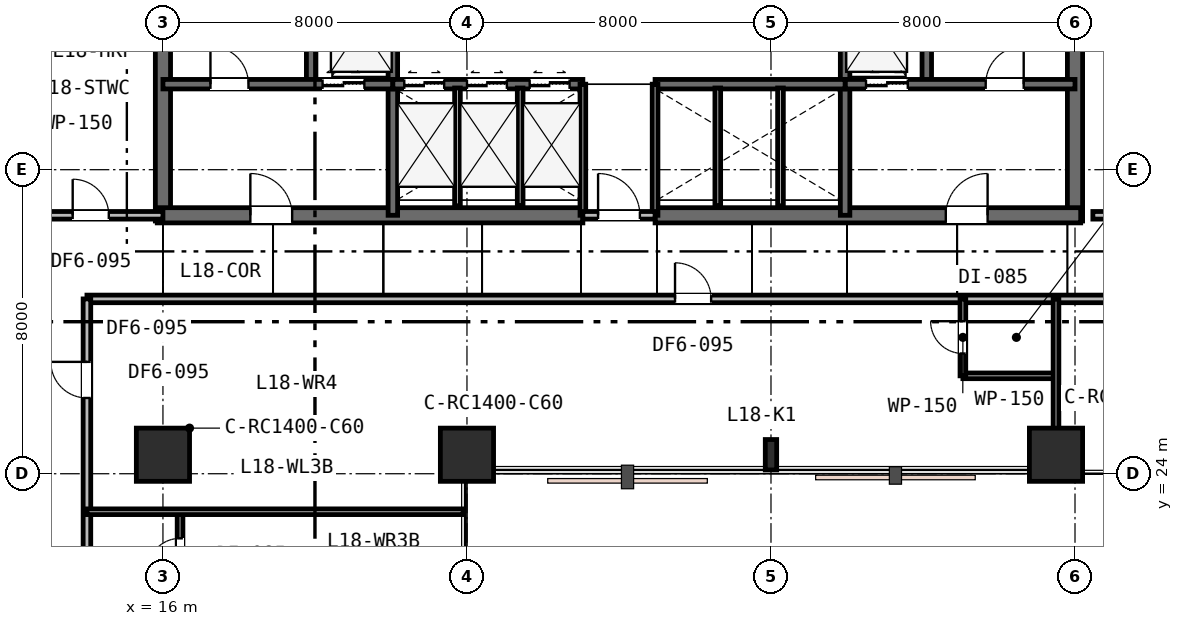
"""IFC4 building model, lengths in metres.
Left out: names, types, materials, properties, quantities, classifications, styles, units other than length and angle.
Written with IfcOpenShell. Run it as: python <this file> out.ifc"""

import sys

from ifc_helpers import new_model, si_unit, direction, frame, frame_2d, origin, origin_2d, place, context, subcontext, project, spatial, rectangle, i_section, extrude, element, fill, save


model = new_model("IFC4")
c1 = context("Model", 3, precision=1e-05, world=origin(), true_north=direction((0.0, 1.0)))
c2 = subcontext(c1, "Body", "Model", "MODEL_VIEW")
j1 = project(units=[si_unit("LENGTHUNIT", "METRE"), si_unit("PLANEANGLEUNIT", "RADIAN")], contexts=[c1])
p1 = place(None, origin())
s1 = spatial("IfcSite", under=j1, at=p1, CompositionType="ELEMENT")
p2 = place(p1, origin())
s2 = spatial("IfcBuilding", under=s1, at=p2, CompositionType="ELEMENT")
p3 = place(p2, frame((0.0, 0.0, 72.6)))
s3 = spatial("IfcBuildingStorey", under=s2, at=p3, CompositionType="ELEMENT", Elevation=72.6)
for number, where, z_axis, x_axis in (
    (1, (16.0, 30.65, 0.0), (0.0, 0.0, 1.0), (0.0, 1.0, 0.0)),
    (2, (40.0, 30.65, 0.0), (0.0, 0.0, 1.0), (0.0, 1.0, 0.0)),
):
    element("IfcWall", number, at=place(p3, frame(where, z_axis=z_axis, x_axis=x_axis)), inside=s3, PredefinedType="SHEAR", context=c2, shape_type="SweptSolid", body=[
        extrude(rectangle(XDim=12.3, YDim=0.4, at=frame_2d((6.15, 0.0))), origin(), (0.0, 0.0, 1.0), 3.6),
    ])
p4 = place(p3, frame((15.85, 30.8, 0.0), z_axis=(0.0, 0.0, 1.0), x_axis=(1.0, 0.0, 0.0)))
e3 = element("IfcWall", 3, at=p4, inside=s3, PredefinedType="SHEAR", context=c2, shape_type="SweptSolid", body=[
    extrude(rectangle(XDim=11.2, YDim=0.4, at=frame_2d((5.6, 0.0))), origin(), (0.0, 0.0, 1.0), 3.6),
])
p5 = place(p4, frame((2.45, 0.0, 0.0)))
e4 = element("IfcOpeningElement", 4, at=p5, cuts=e3, PredefinedType="OPENING", context=c2, shape_type="SweptSolid", body=[
    extrude(rectangle(XDim=1.1, YDim=2.15, at=frame_2d((0.55, 1.075))), frame((0.0, 0.21, 0.0), z_axis=(0.0, -1.0, 0.0), x_axis=(1.0, 0.0, 0.0)), (0.0, 0.0, 1.0), 0.42),
])
p6 = place(p3, frame((28.95, 30.8, 0.0), z_axis=(0.0, 0.0, 1.0), x_axis=(1.0, 0.0, 0.0)))
e5 = element("IfcWall", 5, at=p6, inside=s3, PredefinedType="SHEAR", context=c2, shape_type="SweptSolid", body=[
    extrude(rectangle(XDim=11.2, YDim=0.4, at=frame_2d((5.6, 0.0))), origin(), (0.0, 0.0, 1.0), 3.6),
])
p7 = place(p6, frame((7.65, 0.0, 0.0)))
e6 = element("IfcOpeningElement", 6, at=p7, cuts=e5, PredefinedType="OPENING", context=c2, shape_type="SweptSolid", body=[
    extrude(rectangle(XDim=1.1, YDim=2.15, at=frame_2d((0.55, 1.075))), frame((0.0, 0.21, 0.0), z_axis=(0.0, -1.0, 0.0), x_axis=(1.0, 0.0, 0.0)), (0.0, 0.0, 1.0), 0.42),
])
for number, where, z_axis, x_axis in (
    (7, (19.9, 34.25, 0.0), (0.0, 0.0, 1.0), (0.0, 1.0, 0.0)),
    (8, (36.1, 34.25, 0.0), (0.0, 0.0, 1.0), (0.0, 1.0, 0.0)),
):
    element("IfcWall", number, at=place(p3, frame(where, z_axis=z_axis, x_axis=x_axis)), inside=s3, PredefinedType="SHEAR", context=c2, shape_type="SweptSolid", body=[
        extrude(rectangle(XDim=8.65, YDim=0.25, at=frame_2d((4.325, 0.0))), origin(), (0.0, 0.0, 1.0), 3.6),
    ])
for number, where, z_axis, x_axis in (
    (9, (22.05, 30.8, 0.0), (0.0, 0.0, 1.0), (0.0, 1.0, 0.0)),
    (10, (33.95, 30.8, 0.0), (0.0, 0.0, 1.0), (0.0, 1.0, 0.0)),
):
    element("IfcWall", number, at=place(p3, frame(where, z_axis=z_axis, x_axis=x_axis)), inside=s3, PredefinedType="SHEAR", context=c2, shape_type="SweptSolid", body=[
        extrude(rectangle(XDim=6.45, YDim=0.25, at=frame_2d((3.225, 0.0))), origin(), (0.0, 0.0, 1.0), 3.6),
    ])
p8 = place(p3, frame((16.0, 34.25, 0.0), z_axis=(0.0, 0.0, 1.0), x_axis=(1.0, 0.0, 0.0)))
e11 = element("IfcWall", 11, at=p8, inside=s3, PredefinedType="SHEAR", context=c2, shape_type="SweptSolid", body=[
    extrude(rectangle(XDim=6.05, YDim=0.25, at=frame_2d((3.025, 0.0))), origin(), (0.0, 0.0, 1.0), 3.6),
])
p9 = place(p8, frame((1.25, 0.0, 0.0)))
e12 = element("IfcOpeningElement", 12, at=p9, cuts=e11, PredefinedType="OPENING", context=c2, shape_type="SweptSolid", body=[
    extrude(rectangle(XDim=1.0, YDim=2.15, at=frame_2d((0.5, 1.075))), frame((0.0, 0.135, 0.0), z_axis=(0.0, -1.0, 0.0), x_axis=(1.0, 0.0, 0.0)), (0.0, 0.0, 1.0), 0.27),
])
p10 = place(p8, frame((4.2, 0.0, 0.0)))
e13 = element("IfcOpeningElement", 13, at=p10, cuts=e11, PredefinedType="OPENING", context=c2, shape_type="SweptSolid", body=[
    extrude(rectangle(XDim=1.1, YDim=2.15, at=frame_2d((0.55, 1.075))), frame((0.0, 0.135, 0.0), z_axis=(0.0, -1.0, 0.0), x_axis=(1.0, 0.0, 0.0)), (0.0, 0.0, 1.0), 0.27),
])
p11 = place(p3, frame((33.95, 34.25, 0.0), z_axis=(0.0, 0.0, 1.0), x_axis=(1.0, 0.0, 0.0)))
e14 = element("IfcWall", 14, at=p11, inside=s3, PredefinedType="SHEAR", context=c2, shape_type="SweptSolid", body=[
    extrude(rectangle(XDim=6.05, YDim=0.25, at=frame_2d((3.025, 0.0))), origin(), (0.0, 0.0, 1.0), 3.6),
])
p12 = place(p11, frame((3.7, 0.0, 0.0)))
e15 = element("IfcOpeningElement", 15, at=p12, cuts=e14, PredefinedType="OPENING", context=c2, shape_type="SweptSolid", body=[
    extrude(rectangle(XDim=1.0, YDim=2.15, at=frame_2d((0.5, 1.075))), frame((0.0, 0.135, 0.0), z_axis=(0.0, -1.0, 0.0), x_axis=(1.0, 0.0, 0.0)), (0.0, 0.0, 1.0), 0.27),
])
p13 = place(p11, frame((0.55, 0.0, 0.0)))
e16 = element("IfcOpeningElement", 16, at=p13, cuts=e14, PredefinedType="OPENING", context=c2, shape_type="SweptSolid", body=[
    extrude(rectangle(XDim=1.1, YDim=2.15, at=frame_2d((0.55, 1.075))), frame((0.0, 0.135, 0.0), z_axis=(0.0, -1.0, 0.0), x_axis=(1.0, 0.0, 0.0)), (0.0, 0.0, 1.0), 0.27),
])
p14 = place(p3, frame((22.05, 34.25, 0.0), z_axis=(0.0, 0.0, 1.0), x_axis=(1.0, 0.0, 0.0)))
e17 = element("IfcWall", 17, at=p14, inside=s3, PredefinedType="SHEAR", context=c2, shape_type="SweptSolid", body=[
    extrude(rectangle(XDim=5.0, YDim=0.25, at=frame_2d((2.5, 0.0))), origin(), (0.0, 0.0, 1.0), 3.6),
])
p15 = place(p14, frame((0.3, 0.0, 0.0)))
e18 = element("IfcOpeningElement", 18, at=p15, cuts=e17, PredefinedType="OPENING", context=c2, shape_type="SweptSolid", body=[
    extrude(rectangle(XDim=1.05, YDim=2.15, at=frame_2d((0.525, 1.075))), frame((0.0, 0.135, 0.0), z_axis=(0.0, -1.0, 0.0), x_axis=(1.0, 0.0, 0.0)), (0.0, 0.0, 1.0), 0.27),
])
p16 = place(p14, frame((1.95, 0.0, 0.0)))
e19 = element("IfcOpeningElement", 19, at=p16, cuts=e17, PredefinedType="OPENING", context=c2, shape_type="SweptSolid", body=[
    extrude(rectangle(XDim=1.05, YDim=2.15, at=frame_2d((0.525, 1.075))), frame((0.0, 0.135, 0.0), z_axis=(0.0, -1.0, 0.0), x_axis=(1.0, 0.0, 0.0)), (0.0, 0.0, 1.0), 0.27),
])
p17 = place(p14, frame((3.6, 0.0, 0.0)))
e20 = element("IfcOpeningElement", 20, at=p17, cuts=e17, PredefinedType="OPENING", context=c2, shape_type="SweptSolid", body=[
    extrude(rectangle(XDim=1.05, YDim=2.15, at=frame_2d((0.525, 1.075))), frame((0.0, 0.135, 0.0), z_axis=(0.0, -1.0, 0.0), x_axis=(1.0, 0.0, 0.0)), (0.0, 0.0, 1.0), 0.27),
])
p18 = place(p3, frame((28.95, 34.25, 0.0), z_axis=(0.0, 0.0, 1.0), x_axis=(1.0, 0.0, 0.0)))
e21 = element("IfcWall", 21, at=p18, inside=s3, PredefinedType="SHEAR", context=c2, shape_type="SweptSolid", body=[
    extrude(rectangle(XDim=5.0, YDim=0.25, at=frame_2d((2.5, 0.0))), origin(), (0.0, 0.0, 1.0), 3.6),
])
for number, where, z_axis, x_axis in (
    (22, (16.0, 24.5, 0.0), (0.0, 0.0, 1.0), (1.0, 0.0, 0.0)),
    (23, (24.0, 24.5, 0.0), (0.0, 0.0, 1.0), (1.0, 0.0, 0.0)),
):
    element("IfcColumn", number, at=place(p3, frame(where, z_axis=z_axis, x_axis=x_axis)), inside=s3, PredefinedType="COLUMN", context=c2, shape_type="SweptSolid", body=[
        extrude(rectangle(XDim=1.4, YDim=1.4, at=origin_2d()), origin(), (0.0, 0.0, 1.0), 3.6),
    ])
p19 = place(p3, frame((32.0, 24.5, 0.0), z_axis=(0.0, 0.0, 1.0), x_axis=(1.0, 0.0, 0.0)))
e24 = element("IfcColumn", 24, at=p19, inside=s3, PredefinedType="COLUMN", context=c2, shape_type="SweptSolid", body=[
    extrude(i_section(OverallWidth=0.3, OverallDepth=0.8, WebThickness=0.018, FlangeThickness=0.033, FilletRadius=0.03, at=origin_2d()), origin(), (0.0, 0.0, 1.0), 3.6),
])
p20 = place(p3, frame((39.5, 24.5, 0.0), z_axis=(0.0, 0.0, 1.0), x_axis=(1.0, 0.0, 0.0)))
e25 = element("IfcColumn", 25, at=p20, inside=s3, PredefinedType="COLUMN", context=c2, shape_type="SweptSolid", body=[
    extrude(rectangle(XDim=1.4, YDim=1.4, at=origin_2d()), origin(), (0.0, 0.0, 1.0), 3.6),
])
for number, where, z_axis, x_axis in (
    (26, (27.05, 30.8, 0.0), (0.0, 0.0, 1.0), (0.0, 1.0, 0.0)),
    (27, (28.95, 30.8, 0.0), (0.0, 0.0, 1.0), (0.0, 1.0, 0.0)),
):
    element("IfcWall", number, at=place(p3, frame(where, z_axis=z_axis, x_axis=x_axis)), inside=s3, PredefinedType="PLUMBINGWALL", context=c2, shape_type="SweptSolid", body=[
        extrude(rectangle(XDim=3.45, YDim=0.15, at=frame_2d((1.725, 0.0))), origin(), (0.0, 0.0, 1.0), 3.33),
    ])
p21 = place(p3, frame((27.05, 30.8, 0.0), z_axis=(0.0, 0.0, 1.0), x_axis=(1.0, 0.0, 0.0)))
e28 = element("IfcWall", 28, at=p21, inside=s3, PredefinedType="PARTITIONING", context=c2, shape_type="SweptSolid", body=[
    extrude(rectangle(XDim=1.9, YDim=0.2, at=frame_2d((0.95, 0.0))), origin(), (0.0, 0.0, 1.0), 3.33),
])
p22 = place(p21, frame((0.4, 0.0, 0.0)))
e29 = element("IfcOpeningElement", 29, at=p22, cuts=e28, PredefinedType="OPENING", context=c2, shape_type="SweptSolid", body=[
    extrude(rectangle(XDim=1.1, YDim=2.15, at=frame_2d((0.55, 1.075))), frame((0.0, 0.11, 0.0), z_axis=(0.0, -1.0, 0.0), x_axis=(1.0, 0.0, 0.0)), (0.0, 0.0, 1.0), 0.22),
])
for number, where, z_axis, x_axis in (
    (30, (23.75, 31.05, 0.0), (0.0, 0.0, 1.0), (0.0, 1.0, 0.0)),
    (31, (25.4, 31.05, 0.0), (0.0, 0.0, 1.0), (0.0, 1.0, 0.0)),
    (32, (30.6, 31.05, 0.0), (0.0, 0.0, 1.0), (0.0, 1.0, 0.0)),
    (33, (32.25, 31.05, 0.0), (0.0, 0.0, 1.0), (0.0, 1.0, 0.0)),
):
    element("IfcWall", number, at=place(p3, frame(where, z_axis=z_axis, x_axis=x_axis)), inside=s3, PredefinedType="PLUMBINGWALL", context=c2, shape_type="SweptSolid", body=[
        extrude(rectangle(XDim=3.1, YDim=0.15, at=frame_2d((1.55, 0.0))), origin(), (0.0, 0.0, 1.0), 3.33),
    ])
p23 = place(p3, frame((14.0, 28.6, 0.0), z_axis=(0.0, 0.0, 1.0), x_axis=(1.0, 0.0, 0.0)))
e34 = element("IfcWall", 34, at=p23, inside=s3, PredefinedType="PARTITIONING", context=c2, shape_type="SweptSolid", body=[
    extrude(rectangle(XDim=36.4, YDim=0.2, at=frame_2d((18.2, 0.0))), origin(), (0.0, 0.0, 1.0), 2.83),
])
p24 = place(p23, frame((15.475, 0.0, 0.0)))
e35 = element("IfcOpeningElement", 35, at=p24, cuts=e34, PredefinedType="OPENING", context=c2, shape_type="SweptSolid", body=[
    extrude(rectangle(XDim=0.95, YDim=2.15, at=frame_2d((0.475, 1.075))), frame((0.0, 0.11, 0.0), z_axis=(0.0, -1.0, 0.0), x_axis=(1.0, 0.0, 0.0)), (0.0, 0.0, 1.0), 0.22),
])
p25 = place(p23, frame((27.986, 0.0, 0.0)))
e36 = element("IfcOpeningElement", 36, at=p25, cuts=e34, PredefinedType="OPENING", context=c2, shape_type="SweptSolid", body=[
    extrude(rectangle(XDim=0.95, YDim=2.15, at=frame_2d((0.475, 1.075))), frame((0.0, 0.11, 0.0), z_axis=(0.0, -1.0, 0.0), x_axis=(1.0, 0.0, 0.0)), (0.0, 0.0, 1.0), 0.22),
])
p26 = place(p3, frame((8.3, 30.8, 0.0), z_axis=(0.0, 0.0, 1.0), x_axis=(1.0, 0.0, 0.0)))
e37 = element("IfcWall", 37, at=p26, inside=s3, PredefinedType="PARTITIONING", context=c2, shape_type="SweptSolid", body=[
    extrude(rectangle(XDim=7.7, YDim=0.2, at=frame_2d((3.85, 0.0))), origin(), (0.0, 0.0, 1.0), 2.83),
])
p27 = place(p26, frame((5.325, 0.0, 0.0)))
e38 = element("IfcOpeningElement", 38, at=p27, cuts=e37, PredefinedType="OPENING", context=c2, shape_type="SweptSolid", body=[
    extrude(rectangle(XDim=0.95, YDim=2.15, at=frame_2d((0.475, 1.075))), frame((0.0, 0.11, 0.0), z_axis=(0.0, -1.0, 0.0), x_axis=(1.0, 0.0, 0.0)), (0.0, 0.0, 1.0), 0.22),
])
p28 = place(p3, frame((37.05, 26.576, 0.0), z_axis=(0.0, 0.0, 1.0), x_axis=(1.0, 0.0, 0.0)))
e39 = element("IfcWall", 39, at=p28, inside=s3, PredefinedType="PARTITIONING", context=c2, shape_type="SweptSolid", body=[
    extrude(rectangle(XDim=2.45, YDim=0.15, at=frame_2d((1.225, 0.0))), origin(), (0.0, 0.0, 1.0), 2.83),
])
p29 = place(p3, frame((37.05, 26.576, 0.0), z_axis=(0.0, 0.0, 1.0), x_axis=(0.0, 1.0, 0.0)))
e40 = element("IfcWall", 40, at=p29, inside=s3, PredefinedType="PARTITIONING", context=c2, shape_type="SweptSolid", body=[
    extrude(rectangle(XDim=2.024, YDim=0.15, at=frame_2d((1.012, 0.0))), origin(), (0.0, 0.0, 1.0), 3.02),
])
p30 = place(p29, frame((0.587, 0.0, 0.0)))
e41 = element("IfcOpeningElement", 41, at=p30, cuts=e40, PredefinedType="OPENING", context=c2, shape_type="SweptSolid", body=[
    extrude(rectangle(XDim=0.85, YDim=2.15, at=frame_2d((0.425, 1.075))), frame((0.0, 0.085, 0.0), z_axis=(0.0, -1.0, 0.0), x_axis=(1.0, 0.0, 0.0)), (0.0, 0.0, 1.0), 0.17),
])
p31 = place(p3, frame((39.5, 28.6, 0.0), z_axis=(0.0, 0.0, 1.0), x_axis=(0.0, -1.0, 0.0)))
e42 = element("IfcWall", 42, at=p31, inside=s3, PredefinedType="PARTITIONING", context=c2, shape_type="SweptSolid", body=[
    extrude(rectangle(XDim=4.5, YDim=0.15, at=frame_2d((2.25, 0.0))), origin(), (0.0, 0.0, 1.0), 2.83),
])
p32 = place(p3, frame((40.47, 30.8, 0.0), z_axis=(0.0, 0.0, 1.0), x_axis=(1.0, 0.0, 0.0)))
e43 = element("IfcWall", 43, at=p32, inside=s3, PredefinedType="PARTITIONING", context=c2, shape_type="SweptSolid", body=[
    extrude(rectangle(XDim=15.43, YDim=0.2, at=frame_2d((7.715, 0.0))), origin(), (0.0, 0.0, 1.0), 2.83),
])
p33 = place(p32, frame((6.673, 0.0, 0.0)))
e44 = element("IfcOpeningElement", 44, at=p33, cuts=e43, PredefinedType="OPENING", context=c2, shape_type="SweptSolid", body=[
    extrude(rectangle(XDim=0.95, YDim=2.15, at=frame_2d((0.475, 1.075))), frame((0.0, 0.11, 0.0), z_axis=(0.0, -1.0, 0.0), x_axis=(1.0, 0.0, 0.0)), (0.0, 0.0, 1.0), 0.22),
])
p34 = place(p3, frame((14.0, 5.6, 0.0), z_axis=(0.0, 0.0, 1.0), x_axis=(0.0, 1.0, 0.0)))
e45 = element("IfcWall", 45, at=p34, inside=s3, PredefinedType="PARTITIONING", context=c2, shape_type="SweptSolid", body=[
    extrude(rectangle(XDim=23.0, YDim=0.2, at=frame_2d((11.5, 0.0))), origin(), (0.0, 0.0, 1.0), 2.83),
])
p35 = place(p34, frame((0.74, 0.0, 0.0)))
e46 = element("IfcOpeningElement", 46, at=p35, cuts=e45, PredefinedType="OPENING", context=c2, shape_type="SweptSolid", body=[
    extrude(rectangle(XDim=0.95, YDim=2.15, at=frame_2d((0.475, 1.075))), frame((0.0, 0.11, 0.0), z_axis=(0.0, -1.0, 0.0), x_axis=(1.0, 0.0, 0.0)), (0.0, 0.0, 1.0), 0.22),
])
p36 = place(p34, frame((6.271, 0.0, 0.0)))
e47 = element("IfcOpeningElement", 47, at=p36, cuts=e45, PredefinedType="OPENING", context=c2, shape_type="SweptSolid", body=[
    extrude(rectangle(XDim=0.95, YDim=2.15, at=frame_2d((0.475, 1.075))), frame((0.0, 0.11, 0.0), z_axis=(0.0, -1.0, 0.0), x_axis=(1.0, 0.0, 0.0)), (0.0, 0.0, 1.0), 0.22),
])
p37 = place(p34, frame((13.626, 0.0, 0.0)))
e48 = element("IfcOpeningElement", 48, at=p37, cuts=e45, PredefinedType="OPENING", context=c2, shape_type="SweptSolid", body=[
    extrude(rectangle(XDim=0.95, YDim=2.15, at=frame_2d((0.475, 1.075))), frame((0.0, 0.11, 0.0), z_axis=(0.0, -1.0, 0.0), x_axis=(1.0, 0.0, 0.0)), (0.0, 0.0, 1.0), 0.22),
])
p38 = place(p34, frame((20.393, 0.0, 0.0)))
e49 = element("IfcOpeningElement", 49, at=p38, cuts=e45, PredefinedType="OPENING", context=c2, shape_type="SweptSolid", body=[
    extrude(rectangle(XDim=0.95, YDim=2.15, at=frame_2d((0.475, 1.075))), frame((0.0, 0.11, 0.0), z_axis=(0.0, -1.0, 0.0), x_axis=(1.0, 0.0, 0.0)), (0.0, 0.0, 1.0), 0.22),
])
p39 = place(p3, frame((16.45, 20.75, 0.0), z_axis=(0.0, 0.0, 1.0), x_axis=(0.0, 1.0, 0.0)))
e50 = element("IfcWall", 50, at=p39, inside=s3, PredefinedType="PARTITIONING", context=c2, shape_type="SweptSolid", body=[
    extrude(rectangle(XDim=2.25, YDim=0.15, at=frame_2d((1.125, 0.0))), origin(), (0.0, 0.0, 1.0), 2.83),
])
p40 = place(p39, frame((0.7, 0.0, 0.0)))
e51 = element("IfcOpeningElement", 51, at=p40, cuts=e50, PredefinedType="OPENING", context=c2, shape_type="SweptSolid", body=[
    extrude(rectangle(XDim=0.85, YDim=2.15, at=frame_2d((0.425, 1.075))), frame((0.0, 0.085, 0.0), z_axis=(0.0, -1.0, 0.0), x_axis=(1.0, 0.0, 0.0)), (0.0, 0.0, 1.0), 0.17),
])
p41 = place(p3, frame((14.0, 23.0, 0.0), z_axis=(0.0, 0.0, 1.0), x_axis=(1.0, 0.0, 0.0)))
e52 = element("IfcWall", 52, at=p41, inside=s3, PredefinedType="PARTITIONING", context=c2, shape_type="SweptSolid", body=[
    extrude(rectangle(XDim=9.9, YDim=0.15, at=frame_2d((4.95, 0.0))), origin(), (0.0, 0.0, 1.0), 2.83),
])
p42 = place(p22, origin())
e53 = element("IfcDoor", 53, at=p42, inside=s3, OperationType="SINGLE_SWING_LEFT", PredefinedType="DOOR", context=c2, shape_type="SweptSolid", body=[
    extrude(rectangle(XDim=1.1, YDim=2.15, at=frame_2d((0.55, 1.075))), frame((0.0, 0.025, 0.0), z_axis=(0.0, -1.0, 0.0), x_axis=(1.0, 0.0, 0.0)), (0.0, 0.0, 1.0), 0.05),
])
fill(e29, e53)
p43 = place(p9, origin())
e54 = element("IfcDoor", 54, at=p43, inside=s3, OperationType="SINGLE_SWING_LEFT", PredefinedType="DOOR", context=c2, shape_type="SweptSolid", body=[
    extrude(rectangle(XDim=1.0, YDim=2.15, at=frame_2d((0.5, 1.075))), frame((0.0, 0.025, 0.0), z_axis=(0.0, -1.0, 0.0), x_axis=(1.0, 0.0, 0.0)), (0.0, 0.0, 1.0), 0.05),
])
fill(e12, e54)
p44 = place(p12, origin())
e55 = element("IfcDoor", 55, at=p44, inside=s3, OperationType="SINGLE_SWING_RIGHT", PredefinedType="DOOR", context=c2, shape_type="SweptSolid", body=[
    extrude(rectangle(XDim=1.0, YDim=2.15, at=frame_2d((0.5, 1.075))), frame((0.0, 0.025, 0.0), z_axis=(0.0, -1.0, 0.0), x_axis=(1.0, 0.0, 0.0)), (0.0, 0.0, 1.0), 0.05),
])
fill(e15, e55)
p45 = place(p5, origin())
e56 = element("IfcDoor", 56, at=p45, inside=s3, OperationType="SINGLE_SWING_LEFT", PredefinedType="DOOR", context=c2, shape_type="SweptSolid", body=[
    extrude(rectangle(XDim=1.1, YDim=2.15, at=frame_2d((0.55, 1.075))), frame((0.0, 0.025, 0.0), z_axis=(0.0, -1.0, 0.0), x_axis=(1.0, 0.0, 0.0)), (0.0, 0.0, 1.0), 0.05),
])
fill(e4, e56)
p46 = place(p7, origin())
e57 = element("IfcDoor", 57, at=p46, inside=s3, OperationType="SINGLE_SWING_RIGHT", PredefinedType="DOOR", context=c2, shape_type="SweptSolid", body=[
    extrude(rectangle(XDim=1.1, YDim=2.15, at=frame_2d((0.55, 1.075))), frame((0.0, 0.025, 0.0), z_axis=(0.0, -1.0, 0.0), x_axis=(1.0, 0.0, 0.0)), (0.0, 0.0, 1.0), 0.05),
])
fill(e6, e57)
p47 = place(p27, origin())
e58 = element("IfcDoor", 58, at=p47, inside=s3, OperationType="SINGLE_SWING_LEFT", PredefinedType="DOOR", context=c2, shape_type="SweptSolid", body=[
    extrude(rectangle(XDim=0.95, YDim=2.15, at=frame_2d((0.475, 1.075))), frame((0.0, 0.025, 0.0), z_axis=(0.0, -1.0, 0.0), x_axis=(1.0, 0.0, 0.0)), (0.0, 0.0, 1.0), 0.05),
])
fill(e38, e58)
p48 = place(p24, origin())
e59 = element("IfcDoor", 59, at=p48, inside=s3, OperationType="SINGLE_SWING_LEFT", PredefinedType="DOOR", context=c2, shape_type="SweptSolid", body=[
    extrude(rectangle(XDim=0.95, YDim=2.15, at=frame_2d((0.475, 1.075))), frame((0.0, 0.025, 0.0), z_axis=(0.0, -1.0, 0.0), x_axis=(1.0, 0.0, 0.0)), (0.0, 0.0, 1.0), 0.05),
])
fill(e35, e59)
p49 = place(p30, origin())
e60 = element("IfcDoor", 60, at=p49, inside=s3, OperationType="SINGLE_SWING_RIGHT", PredefinedType="DOOR", context=c2, shape_type="SweptSolid", body=[
    extrude(rectangle(XDim=0.85, YDim=2.15, at=frame_2d((0.425, 1.075))), frame((0.0, 0.025, 0.0), z_axis=(0.0, -1.0, 0.0), x_axis=(1.0, 0.0, 0.0)), (0.0, 0.0, 1.0), 0.05),
])
fill(e41, e60)
p50 = place(p40, origin())
e61 = element("IfcDoor", 61, at=p50, inside=s3, OperationType="SINGLE_SWING_LEFT", PredefinedType="DOOR", context=c2, shape_type="SweptSolid", body=[
    extrude(rectangle(XDim=0.85, YDim=2.15, at=frame_2d((0.425, 1.075))), frame((0.0, 0.025, 0.0), z_axis=(0.0, -1.0, 0.0), x_axis=(1.0, 0.0, 0.0)), (0.0, 0.0, 1.0), 0.05),
])
fill(e51, e61)
p51 = place(p38, origin())
e62 = element("IfcDoor", 62, at=p51, inside=s3, OperationType="SINGLE_SWING_RIGHT", PredefinedType="DOOR", context=c2, shape_type="SweptSolid", body=[
    extrude(rectangle(XDim=0.95, YDim=2.15, at=frame_2d((0.475, 1.075))), frame((0.0, 0.025, 0.0), z_axis=(0.0, -1.0, 0.0), x_axis=(1.0, 0.0, 0.0)), (0.0, 0.0, 1.0), 0.05),
])
fill(e49, e62)
p52 = place(p10, origin())
e63 = element("IfcDoor", 63, at=p52, inside=s3, OperationType="DOUBLE_DOOR_SLIDING", PredefinedType="DOOR", context=c2, shape_type="SweptSolid", body=[
    extrude(rectangle(XDim=1.1, YDim=2.15, at=frame_2d((0.55, 1.075))), frame((0.0, 0.025, 0.0), z_axis=(0.0, -1.0, 0.0), x_axis=(1.0, 0.0, 0.0)), (0.0, 0.0, 1.0), 0.05),
])
fill(e13, e63)
p53 = place(p13, origin())
e64 = element("IfcDoor", 64, at=p53, inside=s3, OperationType="DOUBLE_DOOR_SLIDING", PredefinedType="DOOR", context=c2, shape_type="SweptSolid", body=[
    extrude(rectangle(XDim=1.1, YDim=2.15, at=frame_2d((0.55, 1.075))), frame((0.0, 0.025, 0.0), z_axis=(0.0, -1.0, 0.0), x_axis=(1.0, 0.0, 0.0)), (0.0, 0.0, 1.0), 0.05),
])
fill(e16, e64)
p54 = place(p15, origin())
e65 = element("IfcDoor", 65, at=p54, inside=s3, OperationType="DOUBLE_DOOR_SLIDING", PredefinedType="DOOR", context=c2, shape_type="SweptSolid", body=[
    extrude(rectangle(XDim=1.05, YDim=2.15, at=frame_2d((0.525, 1.075))), frame((0.0, 0.025, 0.0), z_axis=(0.0, -1.0, 0.0), x_axis=(1.0, 0.0, 0.0)), (0.0, 0.0, 1.0), 0.05),
])
fill(e18, e65)
p55 = place(p16, origin())
e66 = element("IfcDoor", 66, at=p55, inside=s3, OperationType="DOUBLE_DOOR_SLIDING", PredefinedType="DOOR", context=c2, shape_type="SweptSolid", body=[
    extrude(rectangle(XDim=1.05, YDim=2.15, at=frame_2d((0.525, 1.075))), frame((0.0, 0.025, 0.0), z_axis=(0.0, -1.0, 0.0), x_axis=(1.0, 0.0, 0.0)), (0.0, 0.0, 1.0), 0.05),
])
fill(e19, e66)
p56 = place(p17, origin())
e67 = element("IfcDoor", 67, at=p56, inside=s3, OperationType="DOUBLE_DOOR_SLIDING", PredefinedType="DOOR", context=c2, shape_type="SweptSolid", body=[
    extrude(rectangle(XDim=1.05, YDim=2.15, at=frame_2d((0.525, 1.075))), frame((0.0, 0.025, 0.0), z_axis=(0.0, -1.0, 0.0), x_axis=(1.0, 0.0, 0.0)), (0.0, 0.0, 1.0), 0.05),
])
fill(e20, e67)
save(model, sys.argv[1])
